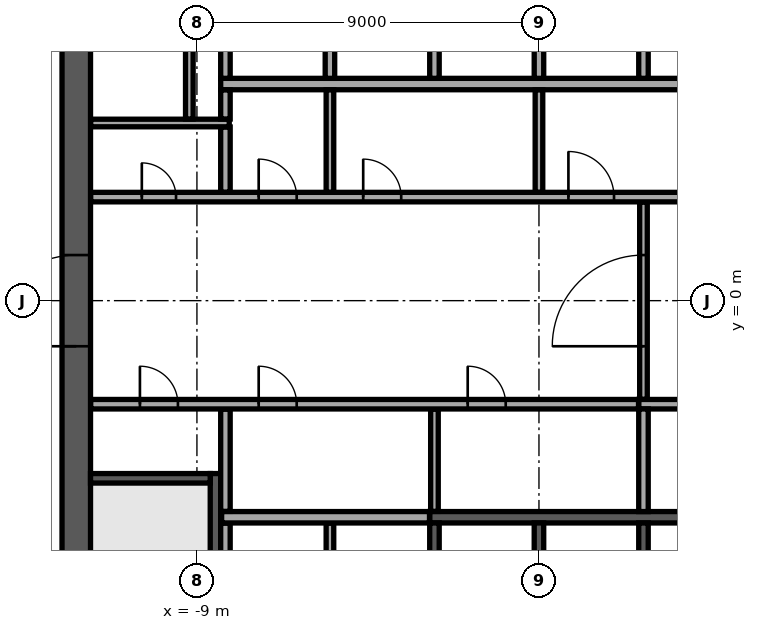
"""IFC4 building model, lengths in metres.
Left out: names, types, materials, properties, quantities, classifications, styles, units other than length and angle.
Written with IfcOpenShell. Run it as: python <this file> out.ifc"""

import sys

from ifc_helpers import new_model, si_unit, direction, frame, frame_2d, origin, place, context, subcontext, project, spatial, rectangle, extrude, element, fill, save


model = new_model("IFC4")
c1 = context("Model", 3, precision=1e-05, world=origin(), true_north=direction((0.0, 1.0)))
c2 = subcontext(c1, "Body", "Model", "MODEL_VIEW")
j1 = project(units=[si_unit("LENGTHUNIT", "METRE"), si_unit("PLANEANGLEUNIT", "RADIAN")], contexts=[c1])
p1 = place(None, origin())
s1 = spatial("IfcSite", under=j1, at=p1, CompositionType="ELEMENT")
p2 = place(p1, origin())
s2 = spatial("IfcBuilding", under=s1, at=p2, CompositionType="ELEMENT")
p3 = place(p2, frame((0.0, 0.0, 246.9)))
s3 = spatial("IfcBuildingStorey", under=s2, at=p3, CompositionType="ELEMENT", Elevation=246.9)
p4 = place(p3, frame((-12.175, -11.8, 0.0), z_axis=(0.0, 0.0, 1.0), x_axis=(0.0, 1.0, 0.0)))
e1 = element("IfcWall", 1, at=p4, inside=s3, PredefinedType="SHEAR", context=c2, shape_type="SweptSolid", body=[
    extrude(rectangle(XDim=23.6, YDim=0.75, at=frame_2d((11.8, 0.0))), origin(), (0.0, 0.0, 1.0), 3.64),
])
p5 = place(p4, frame((10.6, 0.0, 0.0)))
e2 = element("IfcOpeningElement", 2, at=p5, cuts=e1, PredefinedType="OPENING", context=c2, shape_type="SweptSolid", body=[
    extrude(rectangle(XDim=2.4, YDim=2.4, at=frame_2d((1.2, 1.2))), frame((0.0, 0.385, 0.0), z_axis=(0.0, -1.0, 0.0), x_axis=(1.0, 0.0, 0.0)), (0.0, 0.0, 1.0), 0.77),
])
p6 = place(p3, frame((-8.375, 5.7, 0.0), z_axis=(0.0, 0.0, 1.0), x_axis=(1.0, 0.0, 0.0)))
e3 = element("IfcWall", 3, at=p6, inside=s3, PredefinedType="SOLIDWALL", context=c2, shape_type="SweptSolid", body=[
    extrude(rectangle(XDim=16.75, YDim=0.3, at=frame_2d((8.375, 0.0))), origin(), (0.0, 0.0, 1.0), 3.64),
])
p7 = place(p3, frame((-2.875, -5.7, 0.0), z_axis=(0.0, 0.0, 1.0), x_axis=(1.0, 0.0, 0.0)))
e4 = element("IfcWall", 4, at=p7, inside=s3, PredefinedType="SOLIDWALL", context=c2, shape_type="SweptSolid", body=[
    extrude(rectangle(XDim=11.25, YDim=0.3, at=frame_2d((5.625, 0.0))), origin(), (0.0, 0.0, 1.0), 3.64),
])
for number, where, z_axis, x_axis in (
    (5, (-8.25, 5.85, 0.0), (0.0, 0.0, 1.0), (0.0, 1.0, 0.0)),
    (6, (-5.5, 5.85, 0.0), (0.0, 0.0, 1.0), (0.0, 1.0, 0.0)),
    (7, (-2.75, 5.85, 0.0), (0.0, 0.0, 1.0), (0.0, 1.0, 0.0)),
    (8, (0.0, 5.85, 0.0), (0.0, 0.0, 1.0), (0.0, 1.0, 0.0)),
    (9, (2.75, 5.85, 0.0), (0.0, 0.0, 1.0), (0.0, 1.0, 0.0)),
):
    element("IfcWall", number, at=place(p3, frame(where, z_axis=z_axis, x_axis=x_axis)), inside=s3, PredefinedType="SOLIDWALL", context=c2, shape_type="SweptSolid", body=[
        extrude(rectangle(XDim=2.7, YDim=0.25, at=frame_2d((1.35, 0.0))), origin(), (0.0, 0.0, 1.0), 3.64),
    ])
p8 = place(p3, frame((2.625, -2.725, 0.0), z_axis=(0.0, 0.0, 1.0), x_axis=(1.0, 0.0, 0.0)))
e10 = element("IfcWall", 10, at=p8, inside=s3, PredefinedType="SOLIDWALL", context=c2, shape_type="SweptSolid", body=[
    extrude(rectangle(XDim=3.0, YDim=0.25, at=frame_2d((1.5, 0.0))), origin(), (0.0, 0.0, 1.0), 3.64),
])
for number, where, z_axis, x_axis in (
    (11, (2.75, -5.55, 0.0), (0.0, 0.0, 1.0), (0.0, 1.0, 0.0)),
    (12, (-2.75, -8.55, 0.0), (0.0, 0.0, 1.0), (0.0, 1.0, 0.0)),
    (13, (0.0, -8.55, 0.0), (0.0, 0.0, 1.0), (0.0, 1.0, 0.0)),
    (14, (2.75, -8.55, 0.0), (0.0, 0.0, 1.0), (0.0, 1.0, 0.0)),
):
    element("IfcWall", number, at=place(p3, frame(where, z_axis=z_axis, x_axis=x_axis)), inside=s3, PredefinedType="SOLIDWALL", context=c2, shape_type="SweptSolid", body=[
        extrude(rectangle(XDim=2.7, YDim=0.25, at=frame_2d((1.35, 0.0))), origin(), (0.0, 0.0, 1.0), 3.64),
    ])
p9 = place(p3, frame((-8.512, -4.55, 0.0), z_axis=(0.0, 0.0, 1.0), x_axis=(0.0, -1.0, 0.0)))
e15 = element("IfcWall", 15, at=p9, inside=s3, PredefinedType="SOLIDWALL", context=c2, shape_type="SweptSolid", body=[
    extrude(rectangle(XDim=7.25, YDim=0.275, at=frame_2d((3.625, 0.0))), origin(), (0.0, 0.0, 1.0), 3.64),
])
p10 = place(p9, frame((6.0, 0.0, 0.0)))
e16 = element("IfcOpeningElement", 16, at=p10, cuts=e15, PredefinedType="OPENING", context=c2, shape_type="SweptSolid", body=[
    extrude(rectangle(XDim=1.0, YDim=2.1, at=frame_2d((0.5, 1.05))), frame((0.0, 0.147, 0.0), z_axis=(0.0, -1.0, 0.0), x_axis=(1.0, 0.0, 0.0)), (0.0, 0.0, 1.0), 0.295),
])
p11 = place(p3, frame((-8.65, -4.675, 0.0), z_axis=(0.0, 0.0, 1.0), x_axis=(-1.0, 0.0, 0.0)))
e17 = element("IfcWall", 17, at=p11, inside=s3, PredefinedType="SOLIDWALL", context=c2, shape_type="SweptSolid", body=[
    extrude(rectangle(XDim=3.15, YDim=0.25, at=frame_2d((1.575, 0.0))), origin(), (0.0, 0.0, 1.0), 3.64),
])
p12 = place(p3, frame((-8.25, -8.545, 0.0), z_axis=(0.0, 0.0, 1.0), x_axis=(0.0, 1.0, 0.0)))
e18 = element("IfcWall", 18, at=p12, inside=s3, PredefinedType="PARTITIONING", context=c2, shape_type="SweptSolid", body=[
    extrude(rectangle(XDim=2.69, YDim=0.25, at=frame_2d((1.345, 0.0))), origin(), (0.0, 0.0, 1.0), 3.64),
])
p13 = place(p3, frame((-5.5, -8.545, 0.0), z_axis=(0.0, 0.0, 1.0), x_axis=(0.0, 1.0, 0.0)))
e19 = element("IfcWall", 19, at=p13, inside=s3, PredefinedType="PARTITIONING", context=c2, shape_type="SweptSolid", body=[
    extrude(rectangle(XDim=2.69, YDim=0.2, at=frame_2d((1.345, 0.0))), origin(), (0.0, 0.0, 1.0), 3.64),
])
p14 = place(p3, frame((-8.35, -5.7, 0.0), z_axis=(0.0, 0.0, 1.0), x_axis=(1.0, 0.0, 0.0)))
e20 = element("IfcWall", 20, at=p14, inside=s3, PredefinedType="PARTITIONING", context=c2, shape_type="SweptSolid", body=[
    extrude(rectangle(XDim=5.47, YDim=0.3, at=frame_2d((2.735, 0.0))), origin(), (0.0, 0.0, 1.0), 3.64),
])
p15 = place(p3, frame((-8.25, -5.545, 0.0), z_axis=(0.0, 0.0, 1.0), x_axis=(0.0, 1.0, 0.0)))
e21 = element("IfcWall", 21, at=p15, inside=s3, PredefinedType="PARTITIONING", context=c2, shape_type="SweptSolid", body=[
    extrude(rectangle(XDim=2.69, YDim=0.25, at=frame_2d((1.345, 0.0))), origin(), (0.0, 0.0, 1.0), 3.64),
])
p16 = place(p3, frame((-2.75, -5.545, 0.0), z_axis=(0.0, 0.0, 1.0), x_axis=(0.0, 1.0, 0.0)))
e22 = element("IfcWall", 22, at=p16, inside=s3, PredefinedType="PARTITIONING", context=c2, shape_type="SweptSolid", body=[
    extrude(rectangle(XDim=2.69, YDim=0.2, at=frame_2d((1.345, 0.0))), origin(), (0.0, 0.0, 1.0), 3.64),
])
p17 = place(p3, frame((-11.795, -2.725, 0.0), z_axis=(0.0, 0.0, 1.0), x_axis=(1.0, 0.0, 0.0)))
e23 = element("IfcWall", 23, at=p17, inside=s3, PredefinedType="PARTITIONING", context=c2, shape_type="SweptSolid", body=[
    extrude(rectangle(XDim=14.415, YDim=0.25, at=frame_2d((7.208, 0.0))), origin(), (0.0, 0.0, 1.0), 3.64),
])
p18 = place(p17, frame((1.295, 0.0, 0.0)))
e24 = element("IfcOpeningElement", 24, at=p18, cuts=e23, PredefinedType="OPENING", context=c2, shape_type="SweptSolid", body=[
    extrude(rectangle(XDim=1.0, YDim=2.1, at=frame_2d((0.5, 1.05))), frame((0.0, 0.135, 0.0), z_axis=(0.0, -1.0, 0.0), x_axis=(1.0, 0.0, 0.0)), (0.0, 0.0, 1.0), 0.27),
])
p19 = place(p17, frame((4.42, 0.0, 0.0)))
e25 = element("IfcOpeningElement", 25, at=p19, cuts=e23, PredefinedType="OPENING", context=c2, shape_type="SweptSolid", body=[
    extrude(rectangle(XDim=1.0, YDim=2.1, at=frame_2d((0.5, 1.05))), frame((0.0, 0.135, 0.0), z_axis=(0.0, -1.0, 0.0), x_axis=(1.0, 0.0, 0.0)), (0.0, 0.0, 1.0), 0.27),
])
p20 = place(p17, frame((9.92, 0.0, 0.0)))
e26 = element("IfcOpeningElement", 26, at=p20, cuts=e23, PredefinedType="OPENING", context=c2, shape_type="SweptSolid", body=[
    extrude(rectangle(XDim=1.0, YDim=2.1, at=frame_2d((0.5, 1.05))), frame((0.0, 0.135, 0.0), z_axis=(0.0, -1.0, 0.0), x_axis=(1.0, 0.0, 0.0)), (0.0, 0.0, 1.0), 0.27),
])
p21 = place(p3, frame((2.75, -2.595, 0.0), z_axis=(0.0, 0.0, 1.0), x_axis=(0.0, 1.0, 0.0)))
e27 = element("IfcWall", 27, at=p21, inside=s3, PredefinedType="PARTITIONING", context=c2, shape_type="SweptSolid", body=[
    extrude(rectangle(XDim=5.19, YDim=0.2, at=frame_2d((2.595, 0.0))), origin(), (0.0, 0.0, 1.0), 3.64),
])
p22 = place(p21, frame((1.395, 0.0, 0.0)))
e28 = element("IfcOpeningElement", 28, at=p22, cuts=e27, PredefinedType="OPENING", context=c2, shape_type="SweptSolid", body=[
    extrude(rectangle(XDim=2.4, YDim=2.4, at=frame_2d((1.2, 1.2))), frame((0.0, 0.11, 0.0), z_axis=(0.0, -1.0, 0.0), x_axis=(1.0, 0.0, 0.0)), (0.0, 0.0, 1.0), 0.22),
])
p23 = place(p3, frame((-11.795, 2.725, 0.0), z_axis=(0.0, 0.0, 1.0), x_axis=(1.0, 0.0, 0.0)))
e29 = element("IfcWall", 29, at=p23, inside=s3, PredefinedType="PARTITIONING", context=c2, shape_type="SweptSolid", body=[
    extrude(rectangle(XDim=23.59, YDim=0.25, at=frame_2d((11.795, 0.0))), origin(), (0.0, 0.0, 1.0), 3.64),
])
p24 = place(p23, frame((21.345, 0.0, 0.0)))
e30 = element("IfcOpeningElement", 30, at=p24, cuts=e29, PredefinedType="OPENING", context=c2, shape_type="SweptSolid", body=[
    extrude(rectangle(XDim=0.9, YDim=2.1, at=frame_2d((0.45, 1.05))), frame((0.0, 0.135, 0.0), z_axis=(0.0, -1.0, 0.0), x_axis=(1.0, 0.0, 0.0)), (0.0, 0.0, 1.0), 0.27),
])
p25 = place(p23, frame((1.345, 0.0, 0.0)))
e31 = element("IfcOpeningElement", 31, at=p25, cuts=e29, PredefinedType="OPENING", context=c2, shape_type="SweptSolid", body=[
    extrude(rectangle(XDim=0.9, YDim=2.1, at=frame_2d((0.45, 1.05))), frame((0.0, 0.135, 0.0), z_axis=(0.0, -1.0, 0.0), x_axis=(1.0, 0.0, 0.0)), (0.0, 0.0, 1.0), 0.27),
])
p26 = place(p23, frame((4.42, 0.0, 0.0)))
e32 = element("IfcOpeningElement", 32, at=p26, cuts=e29, PredefinedType="OPENING", context=c2, shape_type="SweptSolid", body=[
    extrude(rectangle(XDim=1.0, YDim=2.1, at=frame_2d((0.5, 1.05))), frame((0.0, 0.135, 0.0), z_axis=(0.0, -1.0, 0.0), x_axis=(1.0, 0.0, 0.0)), (0.0, 0.0, 1.0), 0.27),
])
p27 = place(p23, frame((7.17, 0.0, 0.0)))
e33 = element("IfcOpeningElement", 33, at=p27, cuts=e29, PredefinedType="OPENING", context=c2, shape_type="SweptSolid", body=[
    extrude(rectangle(XDim=1.0, YDim=2.1, at=frame_2d((0.5, 1.05))), frame((0.0, 0.135, 0.0), z_axis=(0.0, -1.0, 0.0), x_axis=(1.0, 0.0, 0.0)), (0.0, 0.0, 1.0), 0.27),
])
p28 = place(p23, frame((12.57, 0.0, 0.0)))
e34 = element("IfcOpeningElement", 34, at=p28, cuts=e29, PredefinedType="OPENING", context=c2, shape_type="SweptSolid", body=[
    extrude(rectangle(XDim=1.2, YDim=2.1, at=frame_2d((0.6, 1.05))), frame((0.0, 0.135, 0.0), z_axis=(0.0, -1.0, 0.0), x_axis=(1.0, 0.0, 0.0)), (0.0, 0.0, 1.0), 0.27),
])
p29 = place(p3, frame((-8.25, 2.855, 0.0), z_axis=(0.0, 0.0, 1.0), x_axis=(0.0, 1.0, 0.0)))
e35 = element("IfcWall", 35, at=p29, inside=s3, PredefinedType="PARTITIONING", context=c2, shape_type="SweptSolid", body=[
    extrude(rectangle(XDim=1.715, YDim=0.25, at=frame_2d((0.857, 0.0))), origin(), (0.0, 0.0, 1.0), 3.64),
])
for number, where, z_axis, x_axis in (
    (36, (-5.5, 2.855, 0.0), (0.0, 0.0, 1.0), (0.0, 1.0, 0.0)),
    (37, (0.0, 2.855, 0.0), (0.0, 0.0, 1.0), (0.0, 1.0, 0.0)),
):
    element("IfcWall", number, at=place(p3, frame(where, z_axis=z_axis, x_axis=x_axis)), inside=s3, PredefinedType="PARTITIONING", context=c2, shape_type="SweptSolid", body=[
        extrude(rectangle(XDim=2.69, YDim=0.2, at=frame_2d((1.345, 0.0))), origin(), (0.0, 0.0, 1.0), 3.64),
    ])
p30 = place(p3, frame((-11.795, 4.675, 0.0), z_axis=(0.0, 0.0, 1.0), x_axis=(1.0, 0.0, 0.0)))
e38 = element("IfcWall", 38, at=p30, inside=s3, PredefinedType="PARTITIONING", context=c2, shape_type="SweptSolid", body=[
    extrude(rectangle(XDim=3.645, YDim=0.2, at=frame_2d((1.823, 0.0))), origin(), (0.0, 0.0, 1.0), 3.64),
])
p31 = place(p3, frame((-9.2, 4.78, 0.0), z_axis=(0.0, 0.0, 1.0), x_axis=(0.0, 1.0, 0.0)))
e39 = element("IfcWall", 39, at=p31, inside=s3, PredefinedType="PARTITIONING", context=c2, shape_type="SweptSolid", body=[
    extrude(rectangle(XDim=7.015, YDim=0.2, at=frame_2d((3.507, 0.0))), origin(), (0.0, 0.0, 1.0), 3.64),
])
p32 = place(p31, frame((2.92, 0.0, 0.0)))
e40 = element("IfcOpeningElement", 40, at=p32, cuts=e39, PredefinedType="OPENING", context=c2, shape_type="SweptSolid", body=[
    extrude(rectangle(XDim=1.0, YDim=2.1, at=frame_2d((0.5, 1.05))), frame((0.0, 0.11, 0.0), z_axis=(0.0, -1.0, 0.0), x_axis=(1.0, 0.0, 0.0)), (0.0, 0.0, 1.0), 0.22),
])
p33 = place(p3, frame((-8.25, 4.78, 0.0), z_axis=(0.0, 0.0, 1.0), x_axis=(0.0, 1.0, 0.0)))
e41 = element("IfcWall", 41, at=p33, inside=s3, PredefinedType="PARTITIONING", context=c2, shape_type="SweptSolid", body=[
    extrude(rectangle(XDim=0.765, YDim=0.25, at=frame_2d((0.382, 0.0))), origin(), (0.0, 0.0, 1.0), 3.64),
])
p34 = place(p3, frame((-5.115, 33.491, 0.0), z_axis=(0.0, 0.0, 1.0), x_axis=(-0.57357740375, -0.819151366908, 0.0)))
e42 = element("IfcWall", 42, at=p34, inside=s3, PredefinedType="STANDARD", context=c2, shape_type="SweptSolid", body=[
    extrude(rectangle(XDim=48.843, YDim=0.6, at=frame_2d((24.422, 0.0))), origin(), (0.0, 0.0, 1.0), 3.64),
])
p35 = place(p34, frame((1.22, 0.0, 0.9)))
e43 = element("IfcOpeningElement", 43, at=p35, cuts=e42, PredefinedType="OPENING", context=c2, shape_type="SweptSolid", body=[
    extrude(rectangle(XDim=2.0, YDim=2.1, at=frame_2d((1.0, 1.05))), frame((0.0, 0.31, 0.0), z_axis=(0.0, -1.0, 0.0), x_axis=(1.0, 0.0, 0.0)), (0.0, 0.0, 1.0), 0.62),
])
p36 = place(p34, frame((5.66, 0.0, 0.9)))
e44 = element("IfcOpeningElement", 44, at=p36, cuts=e42, PredefinedType="OPENING", context=c2, shape_type="SweptSolid", body=[
    extrude(rectangle(XDim=2.0, YDim=2.1, at=frame_2d((1.0, 1.05))), frame((0.0, 0.31, 0.0), z_axis=(0.0, -1.0, 0.0), x_axis=(1.0, 0.0, 0.0)), (0.0, 0.0, 1.0), 0.62),
])
p37 = place(p34, frame((10.101, 0.0, 0.9)))
e45 = element("IfcOpeningElement", 45, at=p37, cuts=e42, PredefinedType="OPENING", context=c2, shape_type="SweptSolid", body=[
    extrude(rectangle(XDim=2.0, YDim=2.1, at=frame_2d((1.0, 1.05))), frame((0.0, 0.31, 0.0), z_axis=(0.0, -1.0, 0.0), x_axis=(1.0, 0.0, 0.0)), (0.0, 0.0, 1.0), 0.62),
])
p38 = place(p34, frame((14.541, 0.0, 0.9)))
e46 = element("IfcOpeningElement", 46, at=p38, cuts=e42, PredefinedType="OPENING", context=c2, shape_type="SweptSolid", body=[
    extrude(rectangle(XDim=2.0, YDim=2.1, at=frame_2d((1.0, 1.05))), frame((0.0, 0.31, 0.0), z_axis=(0.0, -1.0, 0.0), x_axis=(1.0, 0.0, 0.0)), (0.0, 0.0, 1.0), 0.62),
])
p39 = place(p34, frame((18.981, 0.0, 0.9)))
e47 = element("IfcOpeningElement", 47, at=p39, cuts=e42, PredefinedType="OPENING", context=c2, shape_type="SweptSolid", body=[
    extrude(rectangle(XDim=2.0, YDim=2.1, at=frame_2d((1.0, 1.05))), frame((0.0, 0.31, 0.0), z_axis=(0.0, -1.0, 0.0), x_axis=(1.0, 0.0, 0.0)), (0.0, 0.0, 1.0), 0.62),
])
p40 = place(p34, frame((23.422, 0.0, 0.9)))
e48 = element("IfcOpeningElement", 48, at=p40, cuts=e42, PredefinedType="OPENING", context=c2, shape_type="SweptSolid", body=[
    extrude(rectangle(XDim=2.0, YDim=2.1, at=frame_2d((1.0, 1.05))), frame((0.0, 0.31, 0.0), z_axis=(0.0, -1.0, 0.0), x_axis=(1.0, 0.0, 0.0)), (0.0, 0.0, 1.0), 0.62),
])
p41 = place(p34, frame((27.862, 0.0, 0.9)))
e49 = element("IfcOpeningElement", 49, at=p41, cuts=e42, PredefinedType="OPENING", context=c2, shape_type="SweptSolid", body=[
    extrude(rectangle(XDim=2.0, YDim=2.1, at=frame_2d((1.0, 1.05))), frame((0.0, 0.31, 0.0), z_axis=(0.0, -1.0, 0.0), x_axis=(1.0, 0.0, 0.0)), (0.0, 0.0, 1.0), 0.62),
])
p42 = place(p34, frame((32.302, 0.0, 0.9)))
e50 = element("IfcOpeningElement", 50, at=p42, cuts=e42, PredefinedType="OPENING", context=c2, shape_type="SweptSolid", body=[
    extrude(rectangle(XDim=2.0, YDim=2.1, at=frame_2d((1.0, 1.05))), frame((0.0, 0.31, 0.0), z_axis=(0.0, -1.0, 0.0), x_axis=(1.0, 0.0, 0.0)), (0.0, 0.0, 1.0), 0.62),
])
p43 = place(p34, frame((36.742, 0.0, 0.9)))
e51 = element("IfcOpeningElement", 51, at=p43, cuts=e42, PredefinedType="OPENING", context=c2, shape_type="SweptSolid", body=[
    extrude(rectangle(XDim=2.0, YDim=2.1, at=frame_2d((1.0, 1.05))), frame((0.0, 0.31, 0.0), z_axis=(0.0, -1.0, 0.0), x_axis=(1.0, 0.0, 0.0)), (0.0, 0.0, 1.0), 0.62),
])
p44 = place(p34, frame((41.183, 0.0, 0.9)))
e52 = element("IfcOpeningElement", 52, at=p44, cuts=e42, PredefinedType="OPENING", context=c2, shape_type="SweptSolid", body=[
    extrude(rectangle(XDim=2.0, YDim=2.1, at=frame_2d((1.0, 1.05))), frame((0.0, 0.31, 0.0), z_axis=(0.0, -1.0, 0.0), x_axis=(1.0, 0.0, 0.0)), (0.0, 0.0, 1.0), 0.62),
])
p45 = place(p34, frame((45.623, 0.0, 0.9)))
e53 = element("IfcOpeningElement", 53, at=p45, cuts=e42, PredefinedType="OPENING", context=c2, shape_type="SweptSolid", body=[
    extrude(rectangle(XDim=2.0, YDim=2.1, at=frame_2d((1.0, 1.05))), frame((0.0, 0.31, 0.0), z_axis=(0.0, -1.0, 0.0), x_axis=(1.0, 0.0, 0.0)), (0.0, 0.0, 1.0), 0.62),
])
p46 = place(p5, origin())
e54 = element("IfcDoor", 54, at=p46, inside=s3, OperationType="SINGLE_SWING_LEFT", PredefinedType="DOOR", context=c2, shape_type="SweptSolid", body=[
    extrude(rectangle(XDim=2.4, YDim=2.4, at=frame_2d((1.2, 1.2))), frame((0.0, 0.025, 0.0), z_axis=(0.0, -1.0, 0.0), x_axis=(1.0, 0.0, 0.0)), (0.0, 0.0, 1.0), 0.05),
])
fill(e2, e54)
p47 = place(p18, origin())
e55 = element("IfcDoor", 55, at=p47, inside=s3, OperationType="SINGLE_SWING_LEFT", PredefinedType="DOOR", context=c2, shape_type="SweptSolid", body=[
    extrude(rectangle(XDim=1.0, YDim=2.1, at=frame_2d((0.5, 1.05))), frame((0.0, 0.025, 0.0), z_axis=(0.0, -1.0, 0.0), x_axis=(1.0, 0.0, 0.0)), (0.0, 0.0, 1.0), 0.05),
])
fill(e24, e55)
p48 = place(p25, origin())
e56 = element("IfcDoor", 56, at=p48, inside=s3, OperationType="SINGLE_SWING_LEFT", PredefinedType="DOOR", context=c2, shape_type="SweptSolid", body=[
    extrude(rectangle(XDim=0.9, YDim=2.1, at=frame_2d((0.45, 1.05))), frame((0.0, 0.025, 0.0), z_axis=(0.0, -1.0, 0.0), x_axis=(1.0, 0.0, 0.0)), (0.0, 0.0, 1.0), 0.05),
])
fill(e31, e56)
p49 = place(p26, origin())
e57 = element("IfcDoor", 57, at=p49, inside=s3, OperationType="SINGLE_SWING_LEFT", PredefinedType="DOOR", context=c2, shape_type="SweptSolid", body=[
    extrude(rectangle(XDim=1.0, YDim=2.1, at=frame_2d((0.5, 1.05))), frame((0.0, 0.025, 0.0), z_axis=(0.0, -1.0, 0.0), x_axis=(1.0, 0.0, 0.0)), (0.0, 0.0, 1.0), 0.05),
])
fill(e32, e57)
p50 = place(p27, origin())
e58 = element("IfcDoor", 58, at=p50, inside=s3, OperationType="SINGLE_SWING_LEFT", PredefinedType="DOOR", context=c2, shape_type="SweptSolid", body=[
    extrude(rectangle(XDim=1.0, YDim=2.1, at=frame_2d((0.5, 1.05))), frame((0.0, 0.025, 0.0), z_axis=(0.0, -1.0, 0.0), x_axis=(1.0, 0.0, 0.0)), (0.0, 0.0, 1.0), 0.05),
])
fill(e33, e58)
p51 = place(p28, origin())
e59 = element("IfcDoor", 59, at=p51, inside=s3, OperationType="SINGLE_SWING_LEFT", PredefinedType="DOOR", context=c2, shape_type="SweptSolid", body=[
    extrude(rectangle(XDim=1.2, YDim=2.1, at=frame_2d((0.6, 1.05))), frame((0.0, 0.025, 0.0), z_axis=(0.0, -1.0, 0.0), x_axis=(1.0, 0.0, 0.0)), (0.0, 0.0, 1.0), 0.05),
])
fill(e34, e59)
p52 = place(p19, origin())
e60 = element("IfcDoor", 60, at=p52, inside=s3, OperationType="SINGLE_SWING_LEFT", PredefinedType="DOOR", context=c2, shape_type="SweptSolid", body=[
    extrude(rectangle(XDim=1.0, YDim=2.1, at=frame_2d((0.5, 1.05))), frame((0.0, 0.025, 0.0), z_axis=(0.0, -1.0, 0.0), x_axis=(1.0, 0.0, 0.0)), (0.0, 0.0, 1.0), 0.05),
])
fill(e25, e60)
p53 = place(p20, origin())
e61 = element("IfcDoor", 61, at=p53, inside=s3, OperationType="SINGLE_SWING_LEFT", PredefinedType="DOOR", context=c2, shape_type="SweptSolid", body=[
    extrude(rectangle(XDim=1.0, YDim=2.1, at=frame_2d((0.5, 1.05))), frame((0.0, 0.025, 0.0), z_axis=(0.0, -1.0, 0.0), x_axis=(1.0, 0.0, 0.0)), (0.0, 0.0, 1.0), 0.05),
])
fill(e26, e61)
p54 = place(p22, origin())
e62 = element("IfcDoor", 62, at=p54, inside=s3, OperationType="SINGLE_SWING_LEFT", PredefinedType="DOOR", context=c2, shape_type="SweptSolid", body=[
    extrude(rectangle(XDim=2.4, YDim=2.4, at=frame_2d((1.2, 1.2))), frame((0.0, 0.025, 0.0), z_axis=(0.0, -1.0, 0.0), x_axis=(1.0, 0.0, 0.0)), (0.0, 0.0, 1.0), 0.05),
])
fill(e28, e62)
save(model, sys.argv[1])
